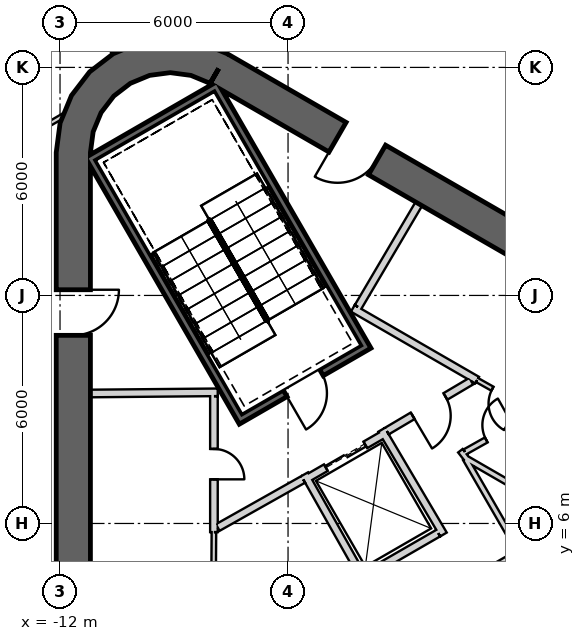
"""IFC4 building model, lengths in metres.
Left out: names, types, materials, properties, quantities, classifications, styles, units other than length and angle.
Written with IfcOpenShell. Run it as: python <this file> out.ifc"""

import sys

from ifc_helpers import new_model, si_unit, direction, frame, frame_2d, origin, place, context, subcontext, project, spatial, polyline, rectangle, outline, extrude, element, fill, save


model = new_model("IFC4")
c1 = context("Model", 3, precision=1e-05, world=origin(), true_north=direction((0.0, 1.0)))
c2 = subcontext(c1, "Body", "Model", "MODEL_VIEW")
j1 = project(units=[si_unit("LENGTHUNIT", "METRE"), si_unit("PLANEANGLEUNIT", "RADIAN")], contexts=[c1])
p1 = place(None, origin())
s1 = spatial("IfcSite", under=j1, at=p1, CompositionType="ELEMENT")
p2 = place(p1, origin())
s2 = spatial("IfcBuilding", under=s1, at=p2, CompositionType="ELEMENT")
p3 = place(p2, frame((0.0, 0.0, -5.5)))
s3 = spatial("IfcBuildingStorey", under=s2, at=p3, CompositionType="ELEMENT", Elevation=-5.5)
p4 = place(p3, frame((-2.547, 37.518, 0.0), z_axis=(0.0, 0.0, 1.0), x_axis=(0.866165180358, -0.499757821684, 0.0)))
e1 = element("IfcWall", 1, at=p4, inside=s3, PredefinedType="SHEAR", context=c2, shape_type="SweptSolid", body=[
    extrude(rectangle(XDim=41.631, YDim=1.0, at=frame_2d((20.815, 0.0))), origin(), (0.0, 0.0, 1.0), 5.5),
])
p5 = place(p3, frame((19.475, 2.208, 0.0), z_axis=(0.0, 0.0, 1.0), x_axis=(-0.866028369851, 0.499994862586, 0.0)))
e2 = element("IfcWall", 2, at=p5, inside=s3, PredefinedType="SHEAR", context=c2, shape_type="SweptSolid", body=[
    extrude(rectangle(XDim=31.523, YDim=0.9, at=frame_2d((15.762, 0.0))), origin(), (0.0, 0.0, 1.0), 5.5),
])
p6 = place(p5, frame((3.612, 0.0, 0.0)))
e3 = element("IfcOpeningElement", 3, at=p6, cuts=e2, PredefinedType="OPENING", context=c2, shape_type="SweptSolid", body=[
    extrude(rectangle(XDim=1.2, YDim=2.4, at=frame_2d((0.6, 1.2))), frame((0.0, 0.46, 0.0), z_axis=(0.0, -1.0, 0.0), x_axis=(1.0, 0.0, 0.0)), (0.0, 0.0, 1.0), 0.92),
])
p7 = place(p5, frame((26.712, 0.0, 0.0)))
e4 = element("IfcOpeningElement", 4, at=p7, cuts=e2, PredefinedType="OPENING", context=c2, shape_type="SweptSolid", body=[
    extrude(rectangle(XDim=1.2, YDim=2.4, at=frame_2d((0.6, 1.2))), frame((0.0, 0.46, 0.0), z_axis=(0.0, -1.0, 0.0), x_axis=(1.0, 0.0, 0.0)), (0.0, 0.0, 1.0), 0.92),
])
p8 = place(p3, frame((-11.65, 15.762, 0.0), z_axis=(0.0, 0.0, 1.0), x_axis=(0.0, -1.0, 0.0)))
e5 = element("IfcWall", 5, at=p8, inside=s3, PredefinedType="SHEAR", context=c2, shape_type="SweptSolid", body=[
    extrude(rectangle(XDim=31.523, YDim=0.9, at=frame_2d((15.762, 0.0))), origin(), (0.0, 0.0, 1.0), 5.5),
])
p9 = place(p8, frame((3.612, 0.0, 0.0)))
e6 = element("IfcOpeningElement", 6, at=p9, cuts=e5, PredefinedType="OPENING", context=c2, shape_type="SweptSolid", body=[
    extrude(rectangle(XDim=1.2, YDim=2.4, at=frame_2d((0.6, 1.2))), frame((0.0, 0.46, 0.0), z_axis=(0.0, -1.0, 0.0), x_axis=(1.0, 0.0, 0.0)), (0.0, 0.0, 1.0), 0.92),
])
p10 = place(p8, frame((26.712, 0.0, 0.0)))
e7 = element("IfcOpeningElement", 7, at=p10, cuts=e5, PredefinedType="OPENING", context=c2, shape_type="SweptSolid", body=[
    extrude(rectangle(XDim=1.2, YDim=2.4, at=frame_2d((0.6, 1.2))), frame((0.0, 0.46, 0.0), z_axis=(0.0, -1.0, 0.0), x_axis=(1.0, 0.0, 0.0)), (0.0, 0.0, 1.0), 0.92),
])
p11 = place(p3, origin())
e8 = element("IfcWall", 8, at=p11, inside=s3, PredefinedType="SHEAR", context=c2, shape_type="SweptSolid", body=[
    extrude(outline(polyline([(-7.6, 18.36), (-8.323, 18.659), (-9.1, 18.762), (-9.876, 18.659), (-10.6, 18.36), (-11.221, 17.883), (-11.698, 17.262), (-11.998, 16.538), (-12.1, 15.762), (-11.2, 15.762), (-11.128, 16.305), (-10.919, 16.812), (-10.585, 17.247), (-10.15, 17.58), (-9.644, 17.79), (-9.1, 17.862), (-8.556, 17.79), (-8.05, 17.58), (-7.6, 18.36)])), origin(), (0.0, 0.0, 1.0), 5.5),
])
p12 = place(p3, frame((-11.245, 15.678, -0.4), z_axis=(0.0, 0.0, 1.0), x_axis=(0.499977274689, -0.866038523851, 0.0)))
e9 = element("IfcWall", 9, at=p12, inside=s3, PredefinedType="SHEAR", context=c2, shape_type="SweptSolid", body=[
    extrude(rectangle(XDim=8.1, YDim=0.2, at=frame_2d((4.05, 0.0))), origin(), (0.0, 0.0, 1.0), 5.5),
])
p13 = place(p3, frame((-7.818, 17.541, -0.4), z_axis=(0.0, 0.0, 1.0), x_axis=(-0.866044365799, -0.499967155389, 0.0)))
e10 = element("IfcWall", 10, at=p13, inside=s3, PredefinedType="SHEAR", context=c2, shape_type="SweptSolid", body=[
    extrude(rectangle(XDim=3.8, YDim=0.2, at=frame_2d((1.9, 0.0))), origin(), (0.0, 0.0, 1.0), 5.5),
])
p14 = place(p3, frame((-7.854, 17.405, -0.4), z_axis=(0.0, 0.0, 1.0), x_axis=(0.499997992926, -0.866026562566, 0.0)))
e11 = element("IfcWall", 11, at=p14, inside=s3, PredefinedType="SHEAR", context=c2, shape_type="SweptSolid", body=[
    extrude(rectangle(XDim=7.9, YDim=0.2, at=frame_2d((3.95, 0.0))), origin(), (0.0, 0.0, 1.0), 5.5),
])
p15 = place(p3, frame((-7.159, 8.8, -0.4), z_axis=(0.0, 0.0, 1.0), x_axis=(0.866047807691, 0.499961193289, 0.0)))
e12 = element("IfcWall", 12, at=p15, inside=s3, PredefinedType="SHEAR", context=c2, shape_type="SweptSolid", body=[
    extrude(rectangle(XDim=3.6, YDim=0.2, at=frame_2d((1.8, 0.0))), origin(), (0.0, 0.0, 1.0), 5.5),
])
p16 = place(p15, frame((1.25, 0.0, 0.4)))
e13 = element("IfcOpeningElement", 13, at=p16, cuts=e12, PredefinedType="OPENING", context=c2, shape_type="SweptSolid", body=[
    extrude(rectangle(XDim=1.1, YDim=2.1, at=frame_2d((0.55, 1.05))), frame((0.0, 0.11, 0.0), z_axis=(0.0, -1.0, 0.0), x_axis=(1.0, 0.0, 0.0)), (0.0, 0.0, 1.0), 0.22),
])
p17 = place(p3, frame((-5.524, 7.168, 0.0), z_axis=(0.0, 0.0, 1.0), x_axis=(0.866024647952, 0.500001309137, 0.0)))
e14 = element("IfcWall", 14, at=p17, inside=s3, PredefinedType="PLUMBINGWALL", context=c2, shape_type="SweptSolid", body=[
    extrude(rectangle(XDim=2.4, YDim=0.2, at=frame_2d((1.2, 0.0))), origin(), (0.0, 0.0, 1.0), 5.1),
])
p18 = place(p17, frame((0.6, 0.0, 0.0)))
e15 = element("IfcOpeningElement", 15, at=p18, cuts=e14, PredefinedType="OPENING", context=c2, shape_type="SweptSolid", body=[
    extrude(rectangle(XDim=1.2, YDim=2.4, at=frame_2d((0.6, 1.2))), frame((0.0, 0.11, 0.0), z_axis=(0.0, -1.0, 0.0), x_axis=(1.0, 0.0, 0.0)), (0.0, 0.0, 1.0), 0.22),
])
p19 = place(p3, frame((-2.047, 5.746, 0.0), z_axis=(0.0, 0.0, 1.0), x_axis=(-0.86605622881, -0.499946605688, 0.0)))
e16 = element("IfcWall", 16, at=p19, inside=s3, PredefinedType="PLUMBINGWALL", context=c2, shape_type="SweptSolid", body=[
    extrude(rectangle(XDim=2.2, YDim=0.2, at=frame_2d((1.1, 0.0))), origin(), (0.0, 0.0, 1.0), 5.1),
])
p20 = place(p3, frame((-3.99, 4.509, 0.0), z_axis=(0.0, 0.0, 1.0), x_axis=(-0.491358283181, 0.870957540612, 0.0)))
e17 = element("IfcWall", 17, at=p20, inside=s3, PredefinedType="PLUMBINGWALL", context=c2, shape_type="SweptSolid", body=[
    extrude(rectangle(XDim=3.2, YDim=0.2, at=frame_2d((1.6, 0.0))), origin(), (0.0, 0.0, 1.0), 5.1),
])
p21 = place(p3, frame((-3.538, 8.465, 0.0), z_axis=(0.0, 0.0, 1.0), x_axis=(0.508616218331, -0.860993346345, 0.0)))
e18 = element("IfcWall", 18, at=p21, inside=s3, PredefinedType="PLUMBINGWALL", context=c2, shape_type="SweptSolid", body=[
    extrude(rectangle(XDim=3.2, YDim=0.2, at=frame_2d((1.6, 0.0))), origin(), (0.0, 0.0, 1.0), 5.1),
])
p22 = place(p3, frame((-7.85, 9.451, 0.0), z_axis=(0.0, 0.0, 1.0), x_axis=(-0.999957167047, -0.009255488683, 0.0)))
e19 = element("IfcWall", 19, at=p22, inside=s3, PredefinedType="PARTITIONING", context=c2, shape_type="SweptSolid", body=[
    extrude(rectangle(XDim=3.35, YDim=0.2, at=frame_2d((1.675, 0.0))), origin(), (0.0, 0.0, 1.0), 5.1),
])
p23 = place(p3, frame((-7.95, 5.772, 0.0), z_axis=(0.0, 0.0, 1.0), x_axis=(0.0, 1.0, 0.0)))
e20 = element("IfcWall", 20, at=p23, inside=s3, PredefinedType="PARTITIONING", context=c2, shape_type="SweptSolid", body=[
    extrude(rectangle(XDim=3.578, YDim=0.2, at=frame_2d((1.789, 0.0))), origin(), (0.0, 0.0, 1.0), 5.1),
])
p24 = place(p23, frame((1.389, 0.0, 0.0)))
e21 = element("IfcOpeningElement", 21, at=p24, cuts=e20, PredefinedType="OPENING", context=c2, shape_type="SweptSolid", body=[
    extrude(rectangle(XDim=0.8, YDim=2.1, at=frame_2d((0.4, 1.05))), frame((0.0, 0.11, 0.0), z_axis=(0.0, -1.0, 0.0), x_axis=(1.0, 0.0, 0.0)), (0.0, 0.0, 1.0), 0.22),
])
p25 = place(p3, frame((-7.95, 5.772, 0.0), z_axis=(0.0, 0.0, 1.0), x_axis=(-0.006679767059, -0.999977690107, 0.0)))
e22 = element("IfcWall", 22, at=p25, inside=s3, PredefinedType="PARTITIONING", context=c2, shape_type="SweptSolid", body=[
    extrude(rectangle(XDim=4.422, YDim=0.12, at=frame_2d((2.211, 0.0))), origin(), (0.0, 0.0, 1.0), 5.1),
])
p26 = place(p3, frame((-4.296, 11.66, 0.0), z_axis=(0.0, 0.0, 1.0), x_axis=(0.866027389382, -0.499996560828, 0.0)))
e23 = element("IfcWall", 23, at=p26, inside=s3, PredefinedType="PARTITIONING", context=c2, shape_type="SweptSolid", body=[
    extrude(rectangle(XDim=3.778, YDim=0.2, at=frame_2d((1.889, 0.0))), origin(), (0.0, 0.0, 1.0), 5.1),
])
p27 = place(p3, frame((-2.558, 14.409, 0.0), z_axis=(0.0, 0.0, 1.0), x_axis=(-0.508018930956, -0.861345903683, 0.0)))
e24 = element("IfcWall", 24, at=p27, inside=s3, PredefinedType="PARTITIONING", context=c2, shape_type="SweptSolid", body=[
    extrude(rectangle(XDim=3.15, YDim=0.2, at=frame_2d((1.575, 0.0))), origin(), (0.0, 0.0, 1.0), 5.1),
])
p28 = place(p3, frame((-1.024, 9.772, 0.0), z_axis=(0.0, 0.0, 1.0), x_axis=(0.871968924608, -0.489561226527, 0.0)))
e25 = element("IfcWall", 25, at=p28, inside=s3, PredefinedType="PARTITIONING", context=c2, shape_type="SweptSolid", body=[
    extrude(rectangle(XDim=1.722, YDim=0.12, at=frame_2d((0.861, 0.0))), origin(), (0.0, 0.0, 1.0), 5.1),
])
p29 = place(p28, frame((0.461, 0.0, 0.0)))
e26 = element("IfcOpeningElement", 26, at=p29, cuts=e25, PredefinedType="OPENING", context=c2, shape_type="SweptSolid", body=[
    extrude(rectangle(XDim=0.8, YDim=2.1, at=frame_2d((0.4, 1.05))), frame((0.0, 0.07, 0.0), z_axis=(0.0, -1.0, 0.0), x_axis=(1.0, 0.0, 0.0)), (0.0, 0.0, 1.0), 0.14),
])
p30 = place(p3, frame((-5.6, 7.16, 0.0), z_axis=(0.0, 0.0, 1.0), x_axis=(-0.871350695252, -0.490660744185, 0.0)))
e27 = element("IfcWall", 27, at=p30, inside=s3, PredefinedType="PARTITIONING", context=c2, shape_type="SweptSolid", body=[
    extrude(rectangle(XDim=2.582, YDim=0.2, at=frame_2d((1.291, 0.0))), origin(), (0.0, 0.0, 1.0), 5.1),
])
p31 = place(p3, frame((-1.179, 9.745, 0.0), z_axis=(0.0, 0.0, 1.0), x_axis=(-0.860630814782, -0.509229418482, 0.0)))
e28 = element("IfcWall", 28, at=p31, inside=s3, PredefinedType="PARTITIONING", context=c2, shape_type="SweptSolid", body=[
    extrude(rectangle(XDim=2.582, YDim=0.2, at=frame_2d((1.291, 0.0))), origin(), (0.0, 0.0, 1.0), 5.1),
])
p32 = place(p31, frame((0.791, 0.0, 0.0)))
e29 = element("IfcOpeningElement", 29, at=p32, cuts=e28, PredefinedType="OPENING", context=c2, shape_type="SweptSolid", body=[
    extrude(rectangle(XDim=1.0, YDim=2.1, at=frame_2d((0.5, 1.05))), frame((0.0, 0.11, 0.0), z_axis=(0.0, -1.0, 0.0), x_axis=(1.0, 0.0, 0.0)), (0.0, 0.0, 1.0), 0.22),
])
p33 = place(p3, frame((7.367, 2.7, 0.0), z_axis=(0.0, 0.0, 1.0), x_axis=(-0.866027158831, 0.499996960157, 0.0)))
e30 = element("IfcWall", 30, at=p33, inside=s3, PredefinedType="PLUMBINGWALL", context=c2, shape_type="SweptSolid", body=[
    extrude(rectangle(XDim=10.06, YDim=0.15, at=frame_2d((5.03, 0.0))), origin(), (0.0, 0.0, 1.0), 5.1),
])
p34 = place(p3, frame((-1.465, 7.914, 0.0), z_axis=(0.0, 0.0, 1.0), x_axis=(0.613555553277, -0.789651557994, 0.0)))
e31 = element("IfcWall", 31, at=p34, inside=s3, PredefinedType="PLUMBINGWALL", context=c2, shape_type="SweptSolid", body=[
    extrude(rectangle(XDim=0.263, YDim=0.15, at=frame_2d((0.132, 0.0))), origin(), (0.0, 0.0, 1.0), 5.1),
])
p35 = place(p3, frame((0.475, 8.905, 0.0), z_axis=(0.0, 0.0, 1.0), x_axis=(-0.871859457225, -0.489756150392, 0.0)))
e32 = element("IfcWall", 32, at=p35, inside=s3, PredefinedType="PLUMBINGWALL", context=c2, shape_type="SweptSolid", body=[
    extrude(rectangle(XDim=2.089, YDim=0.15, at=frame_2d((1.044, 0.0))), origin(), (0.0, 0.0, 1.0), 5.1),
])
p36 = place(p35, frame((0.644, 0.0, 0.0)))
e33 = element("IfcOpeningElement", 33, at=p36, cuts=e32, PredefinedType="OPENING", context=c2, shape_type="SweptSolid", body=[
    extrude(rectangle(XDim=0.8, YDim=2.1, at=frame_2d((0.4, 1.05))), frame((0.0, 0.085, 0.0), z_axis=(0.0, -1.0, 0.0), x_axis=(1.0, 0.0, 0.0)), (0.0, 0.0, 1.0), 0.17),
])
p37 = place(p3, frame((0.153, 5.285, 0.0), z_axis=(0.0, 0.0, 1.0), x_axis=(-0.866059624469, -0.499940723351, 0.0)))
e34 = element("IfcWall", 34, at=p37, inside=s3, PredefinedType="PLUMBINGWALL", context=c2, shape_type="SweptSolid", body=[
    extrude(rectangle(XDim=1.775, YDim=0.15, at=frame_2d((0.888, 0.0))), origin(), (0.0, 0.0, 1.0), 5.1),
])
p38 = place(p3, frame((-1.33, 7.704, 0.0), z_axis=(0.0, 0.0, 1.0), x_axis=(0.499980071345, -0.866036909293, 0.0)))
e35 = element("IfcWall", 35, at=p38, inside=s3, PredefinedType="PLUMBINGWALL", context=c2, shape_type="SweptSolid", body=[
    extrude(rectangle(XDim=2.762, YDim=0.15, at=frame_2d((1.381, 0.0))), origin(), (0.0, 0.0, 1.0), 5.1),
])
p39 = place(p3, frame((32.38, 0.046, 0.0), z_axis=(0.0, 0.0, 1.0), x_axis=(-0.86611360534, 0.499847199298, 0.0)))
e36 = element("IfcWall", 36, at=p39, inside=s3, PredefinedType="PARTITIONING", context=c2, shape_type="SweptSolid", body=[
    extrude(rectangle(XDim=56.078, YDim=0.12, at=frame_2d((28.039, 0.0))), origin(), (0.0, 0.0, 1.0), 4.07),
])
p40 = place(p39, frame((30.481, 0.0, 0.0)))
e37 = element("IfcOpeningElement", 37, at=p40, cuts=e36, PredefinedType="OPENING", context=c2, shape_type="SweptSolid", body=[
    extrude(rectangle(XDim=1.2, YDim=2.4, at=frame_2d((0.6, 1.2))), frame((0.0, 0.07, 0.0), z_axis=(0.0, -1.0, 0.0), x_axis=(1.0, 0.0, 0.0)), (0.0, 0.0, 1.0), 0.14),
])
p41 = place(p39, frame((10.481, 0.0, 0.0)))
e38 = element("IfcOpeningElement", 38, at=p41, cuts=e36, PredefinedType="OPENING", context=c2, shape_type="SweptSolid", body=[
    extrude(rectangle(XDim=1.2, YDim=2.4, at=frame_2d((0.6, 1.2))), frame((0.0, 0.07, 0.0), z_axis=(0.0, -1.0, 0.0), x_axis=(1.0, 0.0, 0.0)), (0.0, 0.0, 1.0), 0.14),
])
p42 = place(p39, frame((45.282, 0.0, 0.0)))
e39 = element("IfcOpeningElement", 39, at=p42, cuts=e36, PredefinedType="OPENING", context=c2, shape_type="SweptSolid", body=[
    extrude(rectangle(XDim=0.9, YDim=2.1, at=frame_2d((0.45, 1.05))), frame((0.0, 0.07, 0.0), z_axis=(0.0, -1.0, 0.0), x_axis=(1.0, 0.0, 0.0)), (0.0, 0.0, 1.0), 0.14),
])
p43 = place(p39, frame((52.061, 0.0, 0.0)))
e40 = element("IfcOpeningElement", 40, at=p43, cuts=e36, PredefinedType="OPENING", context=c2, shape_type="SweptSolid", body=[
    extrude(rectangle(XDim=1.0, YDim=2.1, at=frame_2d((0.5, 1.05))), frame((0.0, 0.07, 0.0), z_axis=(0.0, -1.0, 0.0), x_axis=(1.0, 0.0, 0.0)), (0.0, 0.0, 1.0), 0.14),
])
p44 = place(p3, frame((-11.74, 16.832, 0.0), z_axis=(0.0, 0.0, 1.0), x_axis=(-0.863501067027, -0.504347010741, 0.0)))
e41 = element("IfcWall", 41, at=p44, inside=s3, PredefinedType="PARTITIONING", context=c2, shape_type="SweptSolid", body=[
    extrude(rectangle(XDim=5.166, YDim=0.12, at=frame_2d((2.583, 0.0))), origin(), (0.0, 0.0, 1.0), 4.18),
])
p45 = place(p3, frame((-12.479, 21.615, 0.0), z_axis=(0.0, 0.0, 1.0), x_axis=(0.506545569598, -0.862213190528, 0.0)))
e42 = element("IfcWall", 42, at=p45, inside=s3, PredefinedType="PARTITIONING", context=c2, shape_type="SweptSolid", body=[
    extrude(rectangle(XDim=3.913, YDim=0.12, at=frame_2d((1.956, 0.0))), origin(), (0.0, 0.0, 1.0), 4.07),
])
p46 = place(p16, origin())
e43 = element("IfcDoor", 43, at=p46, inside=s3, OperationType="SINGLE_SWING_LEFT", PredefinedType="USERDEFINED", context=c2, shape_type="SweptSolid", body=[
    extrude(rectangle(XDim=1.1, YDim=2.1, at=frame_2d((0.55, 1.05))), frame((0.0, 0.025, 0.0), z_axis=(0.0, -1.0, 0.0), x_axis=(1.0, 0.0, 0.0)), (0.0, 0.0, 1.0), 0.05),
])
fill(e13, e43)
p47 = place(p32, origin())
e44 = element("IfcDoor", 44, at=p47, inside=s3, OperationType="SINGLE_SWING_RIGHT", PredefinedType="USERDEFINED", context=c2, shape_type="SweptSolid", body=[
    extrude(rectangle(XDim=1.0, YDim=2.1, at=frame_2d((0.5, 1.05))), frame((0.0, 0.025, 0.0), z_axis=(0.0, -1.0, 0.0), x_axis=(1.0, 0.0, 0.0)), (0.0, 0.0, 1.0), 0.05),
])
fill(e29, e44)
p48 = place(p18, origin())
e45 = element("IfcDoor", 45, at=p48, inside=s3, OperationType="SLIDING_TO_LEFT", PredefinedType="USERDEFINED", context=c2, shape_type="SweptSolid", body=[
    extrude(rectangle(XDim=1.2, YDim=2.4, at=frame_2d((0.6, 1.2))), frame((0.0, 0.025, 0.0), z_axis=(0.0, -1.0, 0.0), x_axis=(1.0, 0.0, 0.0)), (0.0, 0.0, 1.0), 0.05),
])
fill(e15, e45)
p49 = place(p36, origin())
e46 = element("IfcDoor", 46, at=p49, inside=s3, OperationType="SINGLE_SWING_LEFT", PredefinedType="USERDEFINED", context=c2, shape_type="SweptSolid", body=[
    extrude(rectangle(XDim=0.8, YDim=2.1, at=frame_2d((0.4, 1.05))), frame((0.0, 0.025, 0.0), z_axis=(0.0, -1.0, 0.0), x_axis=(1.0, 0.0, 0.0)), (0.0, 0.0, 1.0), 0.05),
])
fill(e33, e46)
p50 = place(p24, origin())
e47 = element("IfcDoor", 47, at=p50, inside=s3, OperationType="SINGLE_SWING_LEFT", PredefinedType="USERDEFINED", context=c2, shape_type="SweptSolid", body=[
    extrude(rectangle(XDim=0.8, YDim=2.1, at=frame_2d((0.4, 1.05))), frame((0.0, 0.025, 0.0), z_axis=(0.0, -1.0, 0.0), x_axis=(1.0, 0.0, 0.0)), (0.0, 0.0, 1.0), 0.05),
])
fill(e21, e47)
p51 = place(p29, origin())
e48 = element("IfcDoor", 48, at=p51, inside=s3, OperationType="SINGLE_SWING_RIGHT", PredefinedType="USERDEFINED", context=c2, shape_type="SweptSolid", body=[
    extrude(rectangle(XDim=0.8, YDim=2.1, at=frame_2d((0.4, 1.05))), frame((0.0, 0.025, 0.0), z_axis=(0.0, -1.0, 0.0), x_axis=(1.0, 0.0, 0.0)), (0.0, 0.0, 1.0), 0.05),
])
fill(e26, e48)
p52 = place(p7, origin())
e49 = element("IfcDoor", 49, at=p52, inside=s3, OperationType="SINGLE_SWING_RIGHT", PredefinedType="USERDEFINED", context=c2, shape_type="SweptSolid", body=[
    extrude(rectangle(XDim=1.2, YDim=2.4, at=frame_2d((0.6, 1.2))), frame((0.0, 0.025, 0.0), z_axis=(0.0, -1.0, 0.0), x_axis=(1.0, 0.0, 0.0)), (0.0, 0.0, 1.0), 0.05),
])
fill(e4, e49)
p53 = place(p9, origin())
e50 = element("IfcDoor", 50, at=p53, inside=s3, OperationType="SINGLE_SWING_LEFT", PredefinedType="USERDEFINED", context=c2, shape_type="SweptSolid", body=[
    extrude(rectangle(XDim=1.2, YDim=2.4, at=frame_2d((0.6, 1.2))), frame((0.0, 0.025, 0.0), z_axis=(0.0, -1.0, 0.0), x_axis=(1.0, 0.0, 0.0)), (0.0, 0.0, 1.0), 0.05),
])
fill(e6, e50)
save(model, sys.argv[1])
